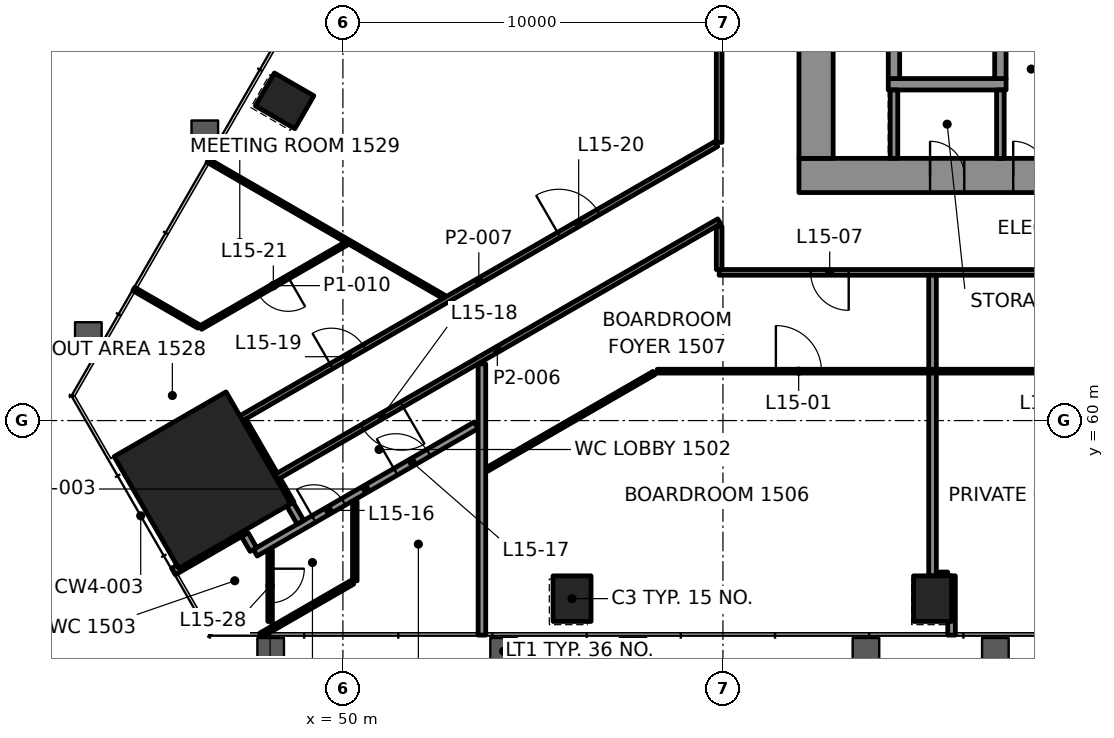
"""IFC4 building model, lengths in metres.
Left out: names, types, materials, properties, quantities, classifications, styles, units other than length and angle.
Written with IfcOpenShell. Run it as: python <this file> out.ifc"""

import sys

from ifc_helpers import new_model, si_unit, direction, frame, frame_2d, origin, origin_2d, place, context, subcontext, project, spatial, rectangle, extrude, element, fill, save


model = new_model("IFC4")
c1 = context("Model", 3, precision=1e-05, world=origin(), true_north=direction((0.0, 1.0)))
c2 = subcontext(c1, "Body", "Model", "MODEL_VIEW")
j1 = project(units=[si_unit("LENGTHUNIT", "METRE"), si_unit("PLANEANGLEUNIT", "RADIAN")], contexts=[c1])
p1 = place(None, origin())
s1 = spatial("IfcSite", under=j1, at=p1, CompositionType="ELEMENT")
p2 = place(p1, origin())
s2 = spatial("IfcBuilding", under=s1, at=p2, CompositionType="ELEMENT")
p3 = place(p2, frame((0.0, 0.0, 69.4)))
s3 = spatial("IfcBuildingStorey", under=s2, at=p3, CompositionType="ELEMENT", Elevation=69.4)
p4 = place(p3, frame((46.303, 58.432, 0.0), z_axis=(0.0, 0.0, 1.0), x_axis=(0.5, -0.866025403784, 0.0)))
e1 = element("IfcColumn", 1, at=p4, inside=s3, PredefinedType="COLUMN", context=c2, shape_type="SweptSolid", body=[
    extrude(rectangle(XDim=3.4, YDim=3.4, at=origin_2d()), origin(), (0.0, 0.0, 1.0), 4.2),
])
for number, where, z_axis, x_axis in (
    (2, (56.029, 55.314, -0.0), (0.0, 0.0, 1.0), (1.0, 0.0, 0.0)),
    (3, (65.515, 55.314, -0.0), (0.0, 0.0, 1.0), (1.0, 0.0, 0.0)),
    (4, (48.466, 68.414, -0.0), (0.0, 0.0, 1.0), (-0.5, -0.866, 0.0)),
):
    element("IfcColumn", number, at=place(p3, frame(where, z_axis=z_axis, x_axis=x_axis)), inside=s3, PredefinedType="COLUMN", context=c2, shape_type="SweptSolid", body=[
        extrude(rectangle(XDim=1.0, YDim=1.2, at=origin_2d()), origin(), (0.0, 0.0, 1.0), 4.2),
    ])
p5 = place(p3, frame((62.0, 66.45, 0.0), z_axis=(0.0, 0.0, 1.0), x_axis=(1.0, 0.0, 0.0)))
e5 = element("IfcWall", 5, at=p5, inside=s3, PredefinedType="SHEAR", context=c2, shape_type="SweptSolid", body=[
    extrude(rectangle(XDim=26.0, YDim=0.9, at=frame_2d((13.0, 0.0))), origin(), (0.0, 0.0, 1.0), 4.0),
])
p6 = place(p5, frame((3.45, 0.0, 0.0)))
e6 = element("IfcOpeningElement", 6, at=p6, cuts=e5, PredefinedType="OPENING", context=c2, shape_type="SweptSolid", body=[
    extrude(rectangle(XDim=0.9, YDim=2.1, at=frame_2d((0.45, 1.05))), frame((0.0, 0.46, 0.0), z_axis=(0.0, -1.0, 0.0), x_axis=(1.0, 0.0, 0.0)), (0.0, 0.0, 1.0), 0.92),
])
p7 = place(p5, frame((5.637, 0.0, 0.0)))
e7 = element("IfcOpeningElement", 7, at=p7, cuts=e5, PredefinedType="OPENING", context=c2, shape_type="SweptSolid", body=[
    extrude(rectangle(XDim=0.9, YDim=2.1, at=frame_2d((0.45, 1.05))), frame((0.0, 0.46, 0.0), z_axis=(0.0, -1.0, 0.0), x_axis=(1.0, 0.0, 0.0)), (0.0, 0.0, 1.0), 0.92),
])
p8 = place(p5, frame((7.212, 0.0, 0.0)))
e8 = element("IfcOpeningElement", 8, at=p8, cuts=e5, PredefinedType="OPENING", context=c2, shape_type="SweptSolid", body=[
    extrude(rectangle(XDim=0.9, YDim=2.1, at=frame_2d((0.45, 1.05))), frame((0.0, 0.46, 0.0), z_axis=(0.0, -1.0, 0.0), x_axis=(1.0, 0.0, 0.0)), (0.0, 0.0, 1.0), 0.92),
])
p9 = place(p5, frame((8.999, 0.0, 0.0)))
e9 = element("IfcOpeningElement", 9, at=p9, cuts=e5, PredefinedType="OPENING", context=c2, shape_type="SweptSolid", body=[
    extrude(rectangle(XDim=0.9, YDim=2.1, at=frame_2d((0.45, 1.05))), frame((0.0, 0.46, 0.0), z_axis=(0.0, -1.0, 0.0), x_axis=(1.0, 0.0, 0.0)), (0.0, 0.0, 1.0), 0.92),
])
p10 = place(p5, frame((17.324, 0.0, 0.0)))
e10 = element("IfcOpeningElement", 10, at=p10, cuts=e5, PredefinedType="OPENING", context=c2, shape_type="SweptSolid", body=[
    extrude(rectangle(XDim=0.9, YDim=2.1, at=frame_2d((0.45, 1.05))), frame((0.0, 0.46, 0.0), z_axis=(0.0, -1.0, 0.0), x_axis=(1.0, 0.0, 0.0)), (0.0, 0.0, 1.0), 0.92),
])
p11 = place(p3, frame((62.45, 66.9, 0.0), z_axis=(0.0, 0.0, 1.0), x_axis=(0.0, 1.0, 0.0)))
e11 = element("IfcWall", 11, at=p11, inside=s3, PredefinedType="SHEAR", context=c2, shape_type="SweptSolid", body=[
    extrude(rectangle(XDim=16.2, YDim=0.9, at=frame_2d((8.1, 0.0))), origin(), (0.0, 0.0, 1.0), 4.0),
])
p12 = place(p11, frame((5.5, 0.0, 0.0)))
e12 = element("IfcOpeningElement", 12, at=p12, cuts=e11, PredefinedType="OPENING", context=c2, shape_type="SweptSolid", body=[
    extrude(rectangle(XDim=1.8, YDim=2.1, at=frame_2d((0.9, 1.05))), frame((0.0, 0.46, 0.0), z_axis=(0.0, -1.0, 0.0), x_axis=(1.0, 0.0, 0.0)), (0.0, 0.0, 1.0), 0.92),
])
p13 = place(p3, frame((64.35, 68.85, 0.0), z_axis=(0.0, 0.0, 1.0), x_axis=(1.0, 0.0, 0.0)))
e13 = element("IfcWall", 13, at=p13, inside=s3, PredefinedType="SHEAR", context=c2, shape_type="SweptSolid", body=[
    extrude(rectangle(XDim=3.1, YDim=0.3, at=frame_2d((1.55, 0.0))), origin(), (0.0, 0.0, 1.0), 4.0),
])
for number, where, z_axis, x_axis in (
    (14, (64.5, 69.0, 0.0), (0.0, 0.0, 1.0), (0.0, 1.0, 0.0)),
    (15, (67.3, 69.0, 0.0), (0.0, 0.0, 1.0), (0.0, 1.0, 0.0)),
):
    element("IfcWall", number, at=place(p3, frame(where, z_axis=z_axis, x_axis=x_axis)), inside=s3, PredefinedType="SHEAR", context=c2, shape_type="SweptSolid", body=[
        extrude(rectangle(XDim=2.6, YDim=0.3, at=frame_2d((1.3, 0.0))), origin(), (0.0, 0.0, 1.0), 4.0),
    ])
p14 = place(p3, frame((65.625, 55.914, 0.0), z_axis=(0.0, 0.0, 1.0), x_axis=(1.0, 0.0, 0.0)))
e16 = element("IfcWall", 16, at=p14, inside=s3, PredefinedType="PARTITIONING", context=c2, shape_type="SweptSolid", body=[
    extrude(rectangle(XDim=0.29, YDim=0.2, at=frame_2d((0.145, 0.0))), origin(), (0.0, 0.0, 1.0), 3.4),
])
p15 = place(p3, frame((58.271, 61.3, 0.0), z_axis=(0.0, 0.0, 1.0), x_axis=(1.0, 0.0, 0.0)))
e17 = element("IfcWall", 17, at=p15, inside=s3, PredefinedType="PARTITIONING", context=c2, shape_type="SweptSolid", body=[
    extrude(rectangle(XDim=26.214, YDim=0.1, at=frame_2d((13.107, 0.0))), origin(), (0.0, 0.0, 1.0), 3.4),
])
p16 = place(p15, frame((3.122, 0.0, 0.0)))
e18 = element("IfcOpeningElement", 18, at=p16, cuts=e17, PredefinedType="OPENING", context=c2, shape_type="SweptSolid", body=[
    extrude(rectangle(XDim=1.2, YDim=2.1, at=frame_2d((0.6, 1.05))), frame((0.0, 0.06, 0.0), z_axis=(0.0, -1.0, 0.0), x_axis=(1.0, 0.0, 0.0)), (0.0, 0.0, 1.0), 0.12),
])
p17 = place(p15, frame((9.957, 0.0, 0.0)))
e19 = element("IfcOpeningElement", 19, at=p17, cuts=e17, PredefinedType="OPENING", context=c2, shape_type="SweptSolid", body=[
    extrude(rectangle(XDim=0.9, YDim=2.1, at=frame_2d((0.45, 1.05))), frame((0.0, 0.06, 0.0), z_axis=(0.0, -1.0, 0.0), x_axis=(1.0, 0.0, 0.0)), (0.0, 0.0, 1.0), 0.12),
])
p18 = place(p15, frame((16.279, 0.0, 0.0)))
e20 = element("IfcOpeningElement", 20, at=p18, cuts=e17, PredefinedType="OPENING", context=c2, shape_type="SweptSolid", body=[
    extrude(rectangle(XDim=0.9, YDim=2.1, at=frame_2d((0.45, 1.05))), frame((0.0, 0.06, 0.0), z_axis=(0.0, -1.0, 0.0), x_axis=(1.0, 0.0, 0.0)), (0.0, 0.0, 1.0), 0.12),
])
p19 = place(p15, frame((22.501, 0.0, 0.0)))
e21 = element("IfcOpeningElement", 21, at=p19, cuts=e17, PredefinedType="OPENING", context=c2, shape_type="SweptSolid", body=[
    extrude(rectangle(XDim=0.9, YDim=2.1, at=frame_2d((0.45, 1.05))), frame((0.0, 0.06, 0.0), z_axis=(0.0, -1.0, 0.0), x_axis=(1.0, 0.0, 0.0)), (0.0, 0.0, 1.0), 0.12),
])
p20 = place(p3, frame((90.099, 63.9, 0.0), z_axis=(0.0, 0.0, 1.0), x_axis=(-1.0, 0.0, 0.0)))
e22 = element("IfcWall", 22, at=p20, inside=s3, PredefinedType="PARTITIONING", context=c2, shape_type="SweptSolid", body=[
    extrude(rectangle(XDim=30.199, YDim=0.15, at=frame_2d((15.1, 0.0))), origin(), (0.0, 0.0, 1.0), 3.4),
])
p21 = place(p20, frame((2.309, 0.0, 0.0)))
e23 = element("IfcOpeningElement", 23, at=p21, cuts=e22, PredefinedType="OPENING", context=c2, shape_type="SweptSolid", body=[
    extrude(rectangle(XDim=1.2, YDim=2.1, at=frame_2d((0.6, 1.05))), frame((0.0, 0.085, 0.0), z_axis=(0.0, -1.0, 0.0), x_axis=(1.0, 0.0, 0.0)), (0.0, 0.0, 1.0), 0.17),
])
p22 = place(p20, frame((14.599, 0.0, 0.0)))
e24 = element("IfcOpeningElement", 24, at=p22, cuts=e22, PredefinedType="OPENING", context=c2, shape_type="SweptSolid", body=[
    extrude(rectangle(XDim=1.0, YDim=2.1, at=frame_2d((0.5, 1.05))), frame((0.0, 0.085, 0.0), z_axis=(0.0, -1.0, 0.0), x_axis=(1.0, 0.0, 0.0)), (0.0, 0.0, 1.0), 0.17),
])
p23 = place(p20, frame((26.791, 0.0, 0.0)))
e25 = element("IfcOpeningElement", 25, at=p23, cuts=e22, PredefinedType="OPENING", context=c2, shape_type="SweptSolid", body=[
    extrude(rectangle(XDim=1.0, YDim=2.1, at=frame_2d((0.5, 1.05))), frame((0.0, 0.085, 0.0), z_axis=(0.0, -1.0, 0.0), x_axis=(1.0, 0.0, 0.0)), (0.0, 0.0, 1.0), 0.17),
])
p24 = place(p3, frame((47.84, 54.354, 0.0), z_axis=(0.0, 0.0, 1.0), x_axis=(0.866007574053, 0.500030880729, 0.0)))
e26 = element("IfcWall", 26, at=p24, inside=s3, PredefinedType="PARTITIONING", context=c2, shape_type="SweptSolid", body=[
    extrude(rectangle(XDim=2.786, YDim=0.12, at=frame_2d((1.393, 0.0))), origin(), (0.0, 0.0, 1.0), 3.4),
])
p25 = place(p3, frame((53.784, 58.71, 0.0), z_axis=(0.0, 0.0, 1.0), x_axis=(0.866049563981, 0.499958150978, 0.0)))
e27 = element("IfcWall", 27, at=p25, inside=s3, PredefinedType="PARTITIONING", context=c2, shape_type="SweptSolid", body=[
    extrude(rectangle(XDim=5.081, YDim=0.1, at=frame_2d((2.541, 0.0))), origin(), (0.0, 0.0, 1.0), 3.4),
])
p26 = place(p3, frame((47.695, 56.521, 0.0), z_axis=(0.0, 0.0, 1.0), x_axis=(0.86602261799, 0.500004825106, 0.0)))
e28 = element("IfcWall", 28, at=p26, inside=s3, PredefinedType="PARTITIONING", context=c2, shape_type="SweptSolid", body=[
    extrude(rectangle(XDim=6.711, YDim=0.2, at=frame_2d((3.355, 0.0))), origin(), (0.0, 0.0, 1.0), 3.4),
])
p27 = place(p26, frame((1.779, 0.0, 0.0)))
e29 = element("IfcOpeningElement", 29, at=p27, cuts=e28, PredefinedType="OPENING", context=c2, shape_type="SweptSolid", body=[
    extrude(rectangle(XDim=0.9, YDim=2.1, at=frame_2d((0.45, 1.05))), frame((0.0, 0.11, 0.0), z_axis=(0.0, -1.0, 0.0), x_axis=(1.0, 0.0, 0.0)), (0.0, 0.0, 1.0), 0.22),
])
p28 = place(p26, frame((4.266, 0.0, 0.0)))
e30 = element("IfcOpeningElement", 30, at=p28, cuts=e28, PredefinedType="OPENING", context=c2, shape_type="SweptSolid", body=[
    extrude(rectangle(XDim=1.0, YDim=2.1, at=frame_2d((0.5, 1.05))), frame((0.0, 0.11, 0.0), z_axis=(0.0, -1.0, 0.0), x_axis=(1.0, 0.0, 0.0)), (0.0, 0.0, 1.0), 0.22),
])
p29 = place(p3, frame((45.542, 56.03, 0.0), z_axis=(0.0, 0.0, 1.0), x_axis=(0.866062227083, 0.499936214752, 0.0)))
e31 = element("IfcWall", 31, at=p29, inside=s3, PredefinedType="PARTITIONING", context=c2, shape_type="SweptSolid", body=[
    extrude(rectangle(XDim=2.109, YDim=0.2, at=frame_2d((1.055, 0.0))), origin(), (0.0, 0.0, 1.0), 3.4),
])
p30 = place(p3, frame((59.9, 65.243, 0.0), z_axis=(0.0, 0.0, 1.0), x_axis=(-0.866023326939, -0.500003597184, 0.0)))
e32 = element("IfcWall", 32, at=p30, inside=s3, PredefinedType="PARTITIONING", context=c2, shape_type="SweptSolid", body=[
    extrude(rectangle(XDim=13.48, YDim=0.15, at=frame_2d((6.74, 0.0))), origin(), (0.0, 0.0, 1.0), 3.247),
])
p31 = place(p30, frame((9.643, 0.0, 0.0)))
e33 = element("IfcOpeningElement", 33, at=p31, cuts=e32, PredefinedType="OPENING", context=c2, shape_type="SweptSolid", body=[
    extrude(rectangle(XDim=1.2, YDim=2.1, at=frame_2d((0.6, 1.05))), frame((0.0, 0.085, 0.0), z_axis=(0.0, -1.0, 0.0), x_axis=(1.0, 0.0, 0.0)), (0.0, 0.0, 1.0), 0.17),
])
p32 = place(p3, frame((47.328, 60.063, 0.0), z_axis=(0.0, 0.0, 1.0), x_axis=(0.86602527873, 0.500000216601, 0.0)))
e34 = element("IfcWall", 34, at=p32, inside=s3, PredefinedType="PARTITIONING", context=c2, shape_type="SweptSolid", body=[
    extrude(rectangle(XDim=14.431, YDim=0.15, at=frame_2d((7.215, 0.0))), origin(), (0.0, 0.0, 1.0), 3.4),
])
p33 = place(p32, frame((2.737, 0.0, 0.0)))
e35 = element("IfcOpeningElement", 35, at=p33, cuts=e34, PredefinedType="OPENING", context=c2, shape_type="SweptSolid", body=[
    extrude(rectangle(XDim=1.0, YDim=2.1, at=frame_2d((0.5, 1.05))), frame((0.0, 0.085, 0.0), z_axis=(0.0, -1.0, 0.0), x_axis=(1.0, 0.0, 0.0)), (0.0, 0.0, 1.0), 0.17),
])
p34 = place(p32, frame((9.649, 0.0, 0.0)))
e36 = element("IfcOpeningElement", 36, at=p34, cuts=e34, PredefinedType="OPENING", context=c2, shape_type="SweptSolid", body=[
    extrude(rectangle(XDim=1.2, YDim=2.1, at=frame_2d((0.6, 1.05))), frame((0.0, 0.085, 0.0), z_axis=(0.0, -1.0, 0.0), x_axis=(1.0, 0.0, 0.0)), (0.0, 0.0, 1.0), 0.17),
])
p35 = place(p3, frame((50.082, 64.655, 0.0), z_axis=(0.0, 0.0, 1.0), x_axis=(-0.866030989016, -0.499990325971, 0.0)))
e37 = element("IfcWall", 37, at=p35, inside=s3, PredefinedType="PARTITIONING", context=c2, shape_type="SweptSolid", body=[
    extrude(rectangle(XDim=4.418, YDim=0.1, at=frame_2d((2.209, 0.0))), origin(), (0.0, 0.0, 1.0), 3.4),
])
p36 = place(p35, frame((1.759, 0.0, 0.0)))
e38 = element("IfcOpeningElement", 38, at=p36, cuts=e37, PredefinedType="OPENING", context=c2, shape_type="SweptSolid", body=[
    extrude(rectangle(XDim=0.9, YDim=2.1, at=frame_2d((0.45, 1.05))), frame((0.0, 0.06, 0.0), z_axis=(0.0, -1.0, 0.0), x_axis=(1.0, 0.0, 0.0)), (0.0, 0.0, 1.0), 0.12),
])
p37 = place(p3, frame((66.015, 54.354, 0.0), z_axis=(0.0, 0.0, 1.0), x_axis=(0.0, 1.0, 0.0)))
e39 = element("IfcWall", 39, at=p37, inside=s3, PredefinedType="PARTITIONING", context=c2, shape_type="SweptSolid", body=[
    extrude(rectangle(XDim=1.56, YDim=0.2, at=frame_2d((0.78, 0.0))), origin(), (0.0, 0.0, 1.0), 3.165),
])
p38 = place(p3, frame((65.515, 55.914, 0.0), z_axis=(0.0, 0.0, 1.0), x_axis=(0.0, 1.0, 0.0)))
e40 = element("IfcWall", 40, at=p38, inside=s3, PredefinedType="PARTITIONING", context=c2, shape_type="SweptSolid", body=[
    extrude(rectangle(XDim=5.336, YDim=0.2, at=frame_2d((2.668, 0.0))), origin(), (0.0, 0.0, 1.0), 3.4),
])
p39 = place(p3, frame((59.9, 63.975, 0.0), z_axis=(0.0, 0.0, 1.0), x_axis=(0.0, 1.0, 0.0)))
e41 = element("IfcWall", 41, at=p39, inside=s3, PredefinedType="PARTITIONING", context=c2, shape_type="SweptSolid", body=[
    extrude(rectangle(XDim=1.131, YDim=0.15, at=frame_2d((0.565, 0.0))), origin(), (0.0, 0.0, 1.0), 3.247),
])
p40 = place(p3, frame((59.9, 67.321, 0.0), z_axis=(0.0, 0.0, 1.0), x_axis=(0.0, 1.0, 0.0)))
e42 = element("IfcWall", 42, at=p40, inside=s3, PredefinedType="PARTITIONING", context=c2, shape_type="SweptSolid", body=[
    extrude(rectangle(XDim=18.778, YDim=0.15, at=frame_2d((9.389, 0.0))), origin(), (0.0, 0.0, 1.0), 3.4),
])
p41 = place(p3, frame((53.658, 54.354, 0.0), z_axis=(0.0, 0.0, 1.0), x_axis=(0.0, 1.0, 0.0)))
e43 = element("IfcWall", 43, at=p41, inside=s3, PredefinedType="PARTITIONING", context=c2, shape_type="SweptSolid", body=[
    extrude(rectangle(XDim=7.138, YDim=0.2, at=frame_2d((3.569, 0.0))), origin(), (0.0, 0.0, 1.0), 3.4),
])
p42 = place(p3, frame((50.313, 55.782, 0.0), z_axis=(0.0, 0.0, 1.0), x_axis=(0.0, 1.0, 0.0)))
e44 = element("IfcWall", 44, at=p42, inside=s3, PredefinedType="PARTITIONING", context=c2, shape_type="SweptSolid", body=[
    extrude(rectangle(XDim=2.096, YDim=0.12, at=frame_2d((1.048, 0.0))), origin(), (0.0, 0.0, 1.0), 3.4),
])
p43 = place(p3, frame((48.084, 56.591, 0.0), z_axis=(0.0, 0.0, 1.0), x_axis=(0.0, -1.0, 0.0)))
e45 = element("IfcWall", 45, at=p43, inside=s3, PredefinedType="PARTITIONING", context=c2, shape_type="SweptSolid", body=[
    extrude(rectangle(XDim=1.877, YDim=0.12, at=frame_2d((0.938, 0.0))), origin(), (0.0, 0.0, 1.0), 3.4),
])
p44 = place(p43, frame((0.488, 0.0, 0.0)))
e46 = element("IfcOpeningElement", 46, at=p44, cuts=e45, PredefinedType="OPENING", context=c2, shape_type="SweptSolid", body=[
    extrude(rectangle(XDim=0.9, YDim=2.1, at=frame_2d((0.45, 1.05))), frame((0.0, 0.07, 0.0), z_axis=(0.0, -1.0, 0.0), x_axis=(1.0, 0.0, 0.0)), (0.0, 0.0, 1.0), 0.14),
])
p45 = place(p3, frame((48.625, 57.81, 0.0), z_axis=(0.0, 0.0, 1.0), x_axis=(-0.500053022251, 0.865994789209, 0.0)))
e47 = element("IfcWall", 47, at=p45, inside=s3, PredefinedType="PARTITIONING", context=c2, shape_type="SweptSolid", body=[
    extrude(rectangle(XDim=0.725, YDim=0.2, at=frame_2d((0.362, 0.0))), origin(), (0.0, 0.0, 1.0), 3.4),
])
p46 = place(p3, frame((48.883, 57.323, 0.0), z_axis=(0.0, 0.0, 1.0), x_axis=(-0.499914787221, 0.866074595816, 0.0)))
e48 = element("IfcWall", 48, at=p46, inside=s3, PredefinedType="PARTITIONING", context=c2, shape_type="SweptSolid", body=[
    extrude(rectangle(XDim=0.549, YDim=0.2, at=frame_2d((0.275, 0.0))), origin(), (0.0, 0.0, 1.0), 3.4),
])
p47 = place(p3, frame((47.644, 56.608, 0.0), z_axis=(0.0, 0.0, 1.0), x_axis=(-0.499644091975, 0.866230789891, 0.0)))
e49 = element("IfcWall", 49, at=p47, inside=s3, PredefinedType="PARTITIONING", context=c2, shape_type="SweptSolid", body=[
    extrude(rectangle(XDim=0.449, YDim=0.2, at=frame_2d((0.225, 0.0))), origin(), (0.0, 0.0, 1.0), 3.4),
])
p48 = place(p3, frame((52.657, 63.256, 0.0), z_axis=(0.0, 0.0, 1.0), x_axis=(-0.866014863173, 0.50001825643, 0.0)))
e50 = element("IfcWall", 50, at=p48, inside=s3, PredefinedType="PARTITIONING", context=c2, shape_type="SweptSolid", body=[
    extrude(rectangle(XDim=7.168, YDim=0.1, at=frame_2d((3.584, 0.0))), origin(), (0.0, 0.0, 1.0), 3.4),
])
p49 = place(p3, frame((46.206, 62.475, 0.0), z_axis=(0.0, 0.0, 1.0), x_axis=(-0.866033041146, 0.499986771468, 0.0)))
e51 = element("IfcWall", 51, at=p49, inside=s3, PredefinedType="PARTITIONING", context=c2, shape_type="SweptSolid", body=[
    extrude(rectangle(XDim=1.972, YDim=0.1, at=frame_2d((0.986, 0.0))), origin(), (0.0, 0.0, 1.0), 3.4),
])
p50 = place(p3, frame((48.187, 58.567, 0.0), z_axis=(0.0, 0.0, 1.0), x_axis=(-0.500013311227, 0.866017718408, 0.0)))
e52 = element("IfcWall", 52, at=p50, inside=s3, PredefinedType="PARTITIONING", context=c2, shape_type="SweptSolid", body=[
    extrude(rectangle(XDim=1.647, YDim=0.2, at=frame_2d((0.823, 0.0))), origin(), (0.0, 0.0, 1.0), 3.247),
])
p51 = place(p3, frame((65.515, 61.35, 0.0), z_axis=(0.0, 0.0, 1.0), x_axis=(0.0, 1.0, 0.0)))
e53 = element("IfcWall", 53, at=p51, inside=s3, PredefinedType="PARTITIONING", context=c2, shape_type="SweptSolid", body=[
    extrude(rectangle(XDim=2.475, YDim=0.2, at=frame_2d((1.237, 0.0))), origin(), (0.0, 0.0, 1.0), 3.4),
])
for number, where, z_axis, x_axis in (
    (54, (64.5, 66.9, 0.0), (0.0, 0.0, 1.0), (0.0, 1.0, 0.0)),
    (55, (67.3, 66.9, 0.0), (0.0, 0.0, 1.0), (0.0, 1.0, 0.0)),
):
    element("IfcWall", number, at=place(p3, frame(where, z_axis=z_axis, x_axis=x_axis)), inside=s3, PredefinedType="PARTITIONING", context=c2, shape_type="SweptSolid", body=[
        extrude(rectangle(XDim=1.8, YDim=0.2, at=frame_2d((0.9, 0.0))), origin(), (0.0, 0.0, 1.0), 4.0),
    ])
p52 = place(p16, origin())
e56 = element("IfcDoor", 56, at=p52, inside=s3, OperationType="DOUBLE_DOOR_SINGLE_SWING", PredefinedType="DOOR", context=c2, shape_type="SweptSolid", body=[
    extrude(rectangle(XDim=1.2, YDim=2.1, at=frame_2d((0.6, 1.05))), frame((0.0, 0.025, 0.0), z_axis=(0.0, -1.0, 0.0), x_axis=(1.0, 0.0, 0.0)), (0.0, 0.0, 1.0), 0.05),
])
fill(e18, e56)
p53 = place(p23, origin())
e57 = element("IfcDoor", 57, at=p53, inside=s3, OperationType="SINGLE_SWING_LEFT", PredefinedType="DOOR", context=c2, shape_type="SweptSolid", body=[
    extrude(rectangle(XDim=1.0, YDim=2.1, at=frame_2d((0.5, 1.05))), frame((0.0, 0.025, 0.0), z_axis=(0.0, -1.0, 0.0), x_axis=(1.0, 0.0, 0.0)), (0.0, 0.0, 1.0), 0.05),
])
fill(e25, e57)
p54 = place(p27, origin())
e58 = element("IfcDoor", 58, at=p54, inside=s3, OperationType="SINGLE_SWING_LEFT", PredefinedType="DOOR", context=c2, shape_type="SweptSolid", body=[
    extrude(rectangle(XDim=0.9, YDim=2.1, at=frame_2d((0.45, 1.05))), frame((0.0, 0.025, 0.0), z_axis=(0.0, -1.0, 0.0), x_axis=(1.0, 0.0, 0.0)), (0.0, 0.0, 1.0), 0.05),
])
fill(e29, e58)
p55 = place(p28, origin())
e59 = element("IfcDoor", 59, at=p55, inside=s3, OperationType="SINGLE_SWING_RIGHT", PredefinedType="DOOR", context=c2, shape_type="SweptSolid", body=[
    extrude(rectangle(XDim=1.0, YDim=2.1, at=frame_2d((0.5, 1.05))), frame((0.0, 0.025, 0.0), z_axis=(0.0, -1.0, 0.0), x_axis=(1.0, 0.0, 0.0)), (0.0, 0.0, 1.0), 0.05),
])
fill(e30, e59)
p56 = place(p31, origin())
e60 = element("IfcDoor", 60, at=p56, inside=s3, OperationType="DOUBLE_DOOR_SINGLE_SWING", PredefinedType="DOOR", context=c2, shape_type="SweptSolid", body=[
    extrude(rectangle(XDim=1.2, YDim=2.1, at=frame_2d((0.6, 1.05))), frame((0.0, 0.025, 0.0), z_axis=(0.0, -1.0, 0.0), x_axis=(1.0, 0.0, 0.0)), (0.0, 0.0, 1.0), 0.05),
])
fill(e33, e60)
p57 = place(p33, origin())
e61 = element("IfcDoor", 61, at=p57, inside=s3, OperationType="SINGLE_SWING_LEFT", PredefinedType="DOOR", context=c2, shape_type="SweptSolid", body=[
    extrude(rectangle(XDim=1.0, YDim=2.1, at=frame_2d((0.5, 1.05))), frame((0.0, 0.025, 0.0), z_axis=(0.0, -1.0, 0.0), x_axis=(1.0, 0.0, 0.0)), (0.0, 0.0, 1.0), 0.05),
])
fill(e35, e61)
p58 = place(p34, origin())
e62 = element("IfcDoor", 62, at=p58, inside=s3, OperationType="DOUBLE_DOOR_SINGLE_SWING", PredefinedType="DOOR", context=c2, shape_type="SweptSolid", body=[
    extrude(rectangle(XDim=1.2, YDim=2.1, at=frame_2d((0.6, 1.05))), frame((0.0, 0.025, 0.0), z_axis=(0.0, -1.0, 0.0), x_axis=(1.0, 0.0, 0.0)), (0.0, 0.0, 1.0), 0.05),
])
fill(e36, e62)
p59 = place(p36, origin())
e63 = element("IfcDoor", 63, at=p59, inside=s3, OperationType="SINGLE_SWING_LEFT", PredefinedType="DOOR", context=c2, shape_type="SweptSolid", body=[
    extrude(rectangle(XDim=0.9, YDim=2.1, at=frame_2d((0.45, 1.05))), frame((0.0, 0.025, 0.0), z_axis=(0.0, -1.0, 0.0), x_axis=(1.0, 0.0, 0.0)), (0.0, 0.0, 1.0), 0.05),
])
fill(e38, e63)
p60 = place(p44, origin())
e64 = element("IfcDoor", 64, at=p60, inside=s3, OperationType="SINGLE_SWING_LEFT", PredefinedType="DOOR", context=c2, shape_type="SweptSolid", body=[
    extrude(rectangle(XDim=0.9, YDim=2.1, at=frame_2d((0.45, 1.05))), frame((0.0, 0.025, 0.0), z_axis=(0.0, -1.0, 0.0), x_axis=(1.0, 0.0, 0.0)), (0.0, 0.0, 1.0), 0.05),
])
fill(e46, e64)
p61 = place(p6, origin())
e65 = element("IfcDoor", 65, at=p61, inside=s3, OperationType="SINGLE_SWING_LEFT", PredefinedType="DOOR", context=c2, shape_type="SweptSolid", body=[
    extrude(rectangle(XDim=0.9, YDim=2.1, at=frame_2d((0.45, 1.05))), frame((0.0, 0.17, 0.0), z_axis=(0.0, -1.0, 0.0), x_axis=(1.0, 0.0, 0.0)), (0.0, 0.0, 1.0), 0.34),
])
fill(e6, e65)
p62 = place(p7, origin())
e66 = element("IfcDoor", 66, at=p62, inside=s3, OperationType="SINGLE_SWING_RIGHT", PredefinedType="DOOR", context=c2, shape_type="SweptSolid", body=[
    extrude(rectangle(XDim=0.9, YDim=2.1, at=frame_2d((0.45, 1.05))), frame((0.0, 0.17, 0.0), z_axis=(0.0, -1.0, 0.0), x_axis=(1.0, 0.0, 0.0)), (0.0, 0.0, 1.0), 0.34),
])
fill(e7, e66)
save(model, sys.argv[1])
